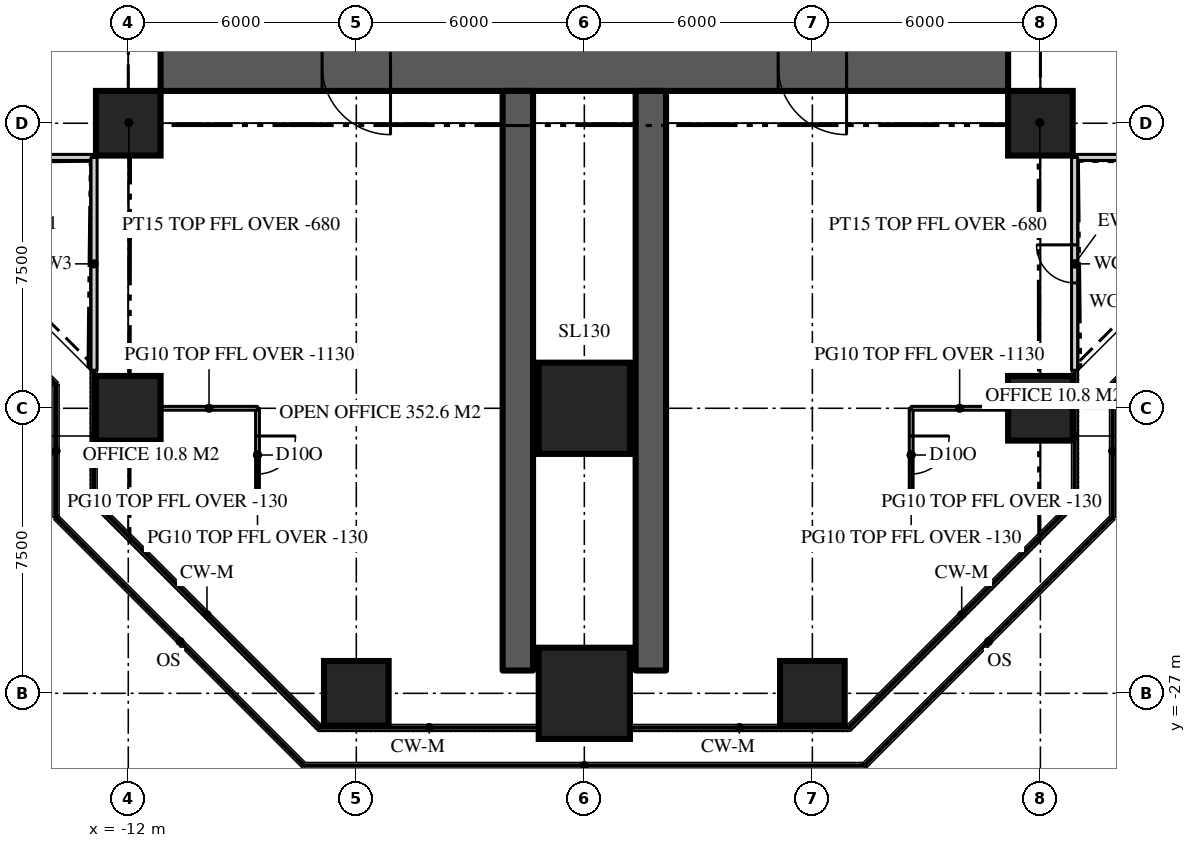
"""IFC4 building model, lengths in metres.
Left out: names, types, materials, properties, quantities, classifications, styles, units other than length and angle.
Written with IfcOpenShell. Run it as: python <this file> out.ifc"""

import sys

from ifc_helpers import new_model, si_unit, direction, frame, frame_2d, origin, origin_2d, place, context, subcontext, project, spatial, rectangle, extrude, element, fill, save


model = new_model("IFC4")
c1 = context("Model", 3, precision=1e-05, world=origin(), true_north=direction((0.0, 1.0)))
c2 = subcontext(c1, "Body", "Model", "MODEL_VIEW")
j1 = project(units=[si_unit("LENGTHUNIT", "METRE"), si_unit("PLANEANGLEUNIT", "RADIAN")], contexts=[c1])
p1 = place(None, origin())
s1 = spatial("IfcSite", under=j1, at=p1, CompositionType="ELEMENT")
p2 = place(p1, origin())
s2 = spatial("IfcBuilding", under=s1, at=p2, CompositionType="ELEMENT")
p3 = place(p2, frame((0.0, 0.0, 143.7)))
s3 = spatial("IfcBuildingStorey", under=s2, at=p3, CompositionType="ELEMENT", Elevation=143.7)
p4 = place(p3, frame((11.15, -10.5, 0.0), z_axis=(0.0, 0.0, 1.0), x_axis=(-1.0, 0.0, 0.0)))
e1 = element("IfcWall", 1, at=p4, inside=s3, PredefinedType="SHEAR", context=c2, shape_type="SweptSolid", body=[
    extrude(rectangle(XDim=22.3, YDim=1.3, at=frame_2d((11.15, 0.0))), origin(), (0.0, 0.0, 1.0), 3.9),
])
p5 = place(p4, frame((16.25, 0.0, 0.0)))
e2 = element("IfcOpeningElement", 2, at=p5, cuts=e1, PredefinedType="OPENING", context=c2, shape_type="SweptSolid", body=[
    extrude(rectangle(XDim=1.8, YDim=2.2, at=frame_2d((0.9, 1.1))), frame((0.0, 0.66, 0.0), z_axis=(0.0, -1.0, 0.0), x_axis=(1.0, 0.0, 0.0)), (0.0, 0.0, 1.0), 1.32),
])
p6 = place(p4, frame((4.25, 0.0, 0.0)))
e3 = element("IfcOpeningElement", 3, at=p6, cuts=e1, PredefinedType="OPENING", context=c2, shape_type="SweptSolid", body=[
    extrude(rectangle(XDim=1.8, YDim=2.2, at=frame_2d((0.9, 1.1))), frame((0.0, 0.66, 0.0), z_axis=(0.0, -1.0, 0.0), x_axis=(1.0, 0.0, 0.0)), (0.0, 0.0, 1.0), 1.32),
])
for number, where, z_axis, x_axis in (
    (4, (-1.75, -11.15, 0.0), (0.0, 0.0, 1.0), (0.0, -1.0, 0.0)),
    (5, (1.75, -11.15, 0.0), (0.0, 0.0, 1.0), (0.0, -1.0, 0.0)),
):
    element("IfcWall", number, at=place(p3, frame(where, z_axis=z_axis, x_axis=x_axis)), inside=s3, PredefinedType="SHEAR", context=c2, shape_type="SweptSolid", body=[
        extrude(rectangle(XDim=15.25, YDim=0.8, at=frame_2d((7.625, 0.0))), origin(), (0.0, 0.0, 1.0), 3.9),
    ])
p7 = place(p3, frame((-6.0, -27.0, 0.0), z_axis=(0.0, 0.0, 1.0), x_axis=(1.0, 0.0, 0.0)))
e6 = element("IfcColumn", 6, at=p7, inside=s3, PredefinedType="COLUMN", context=c2, shape_type="SweptSolid", body=[
    extrude(rectangle(XDim=1.7, YDim=1.7, at=origin_2d()), origin(), (0.0, 0.0, 1.0), 3.9),
])
p8 = place(p3, frame((0.0, -27.0, 0.0), z_axis=(0.0, 0.0, 1.0), x_axis=(1.0, 0.0, 0.0)))
e7 = element("IfcColumn", 7, at=p8, inside=s3, PredefinedType="COLUMN", context=c2, shape_type="SweptSolid", body=[
    extrude(rectangle(XDim=2.4, YDim=2.4, at=origin_2d()), origin(), (0.0, 0.0, 1.0), 3.9),
])
for number, where, z_axis, x_axis in (
    (8, (6.0, -27.0, 0.0), (0.0, 0.0, 1.0), (1.0, 0.0, 0.0)),
    (9, (-12.0, -19.5, 0.0), (0.0, 0.0, 1.0), (1.0, 0.0, 0.0)),
):
    element("IfcColumn", number, at=place(p3, frame(where, z_axis=z_axis, x_axis=x_axis)), inside=s3, PredefinedType="COLUMN", context=c2, shape_type="SweptSolid", body=[
        extrude(rectangle(XDim=1.7, YDim=1.7, at=origin_2d()), origin(), (0.0, 0.0, 1.0), 3.9),
    ])
p9 = place(p3, frame((0.0, -19.5, 0.0), z_axis=(0.0, 0.0, 1.0), x_axis=(1.0, 0.0, 0.0)))
e10 = element("IfcColumn", 10, at=p9, inside=s3, PredefinedType="COLUMN", context=c2, shape_type="SweptSolid", body=[
    extrude(rectangle(XDim=2.4, YDim=2.4, at=origin_2d()), origin(), (0.0, 0.0, 1.0), 3.9),
])
for number, where, z_axis, x_axis in (
    (11, (12.0, -19.5, 0.0), (0.0, 0.0, 1.0), (1.0, 0.0, 0.0)),
    (12, (-12.0, -12.0, 0.0), (0.0, 0.0, 1.0), (1.0, 0.0, 0.0)),
    (13, (12.0, -12.0, 0.0), (0.0, 0.0, 1.0), (1.0, 0.0, 0.0)),
):
    element("IfcColumn", number, at=place(p3, frame(where, z_axis=z_axis, x_axis=x_axis)), inside=s3, PredefinedType="COLUMN", context=c2, shape_type="SweptSolid", body=[
        extrude(rectangle(XDim=1.7, YDim=1.7, at=origin_2d()), origin(), (0.0, 0.0, 1.0), 3.9),
    ])
p10 = place(p3, frame((12.9, -12.9, 0.0), z_axis=(0.0, 0.0, 1.0), x_axis=(1.0, 0.0, 0.0)))
e14 = element("IfcWall", 14, at=p10, inside=s3, PredefinedType="SOLIDWALL", context=c2, shape_type="SweptSolid", body=[
    extrude(rectangle(XDim=5.6, YDim=0.16, at=frame_2d((2.8, 0.0))), origin(), (0.0, 0.0, 1.0), 3.77),
])
p11 = place(p3, frame((-18.5, -12.9, 0.0), z_axis=(0.0, 0.0, 1.0), x_axis=(1.0, 0.0, 0.0)))
e15 = element("IfcWall", 15, at=p11, inside=s3, PredefinedType="SOLIDWALL", context=c2, shape_type="SweptSolid", body=[
    extrude(rectangle(XDim=5.6, YDim=0.16, at=frame_2d((2.8, 0.0))), origin(), (0.0, 0.0, 1.0), 3.77),
])
p12 = place(p11, frame((2.3, 0.0, 0.0)))
e16 = element("IfcOpeningElement", 16, at=p12, cuts=e15, PredefinedType="OPENING", context=c2, shape_type="SweptSolid", body=[
    extrude(rectangle(XDim=1.0, YDim=2.2, at=frame_2d((0.5, 1.1))), frame((0.0, 0.09, 0.0), z_axis=(0.0, -1.0, 0.0), x_axis=(1.0, 0.0, 0.0)), (0.0, 0.0, 1.0), 0.18),
])
p13 = place(p3, frame((-12.9, -12.9, 0.0), z_axis=(0.0, 0.0, 1.0), x_axis=(0.0, -1.0, 0.0)))
e17 = element("IfcWall", 17, at=p13, inside=s3, PredefinedType="SOLIDWALL", context=c2, shape_type="SweptSolid", body=[
    extrude(rectangle(XDim=5.6, YDim=0.16, at=frame_2d((2.8, 0.0))), origin(), (0.0, 0.0, 1.0), 3.77),
])
p14 = place(p3, frame((12.9, -18.5, 0.0), z_axis=(0.0, 0.0, 1.0), x_axis=(0.0, 1.0, 0.0)))
e18 = element("IfcWall", 18, at=p14, inside=s3, PredefinedType="SOLIDWALL", context=c2, shape_type="SweptSolid", body=[
    extrude(rectangle(XDim=5.6, YDim=0.16, at=frame_2d((2.8, 0.0))), origin(), (0.0, 0.0, 1.0), 3.77),
])
p15 = place(p14, frame((2.3, 0.0, 0.0)))
e19 = element("IfcOpeningElement", 19, at=p15, cuts=e18, PredefinedType="OPENING", context=c2, shape_type="SweptSolid", body=[
    extrude(rectangle(XDim=1.0, YDim=2.2, at=frame_2d((0.5, 1.1))), frame((0.0, 0.09, 0.0), z_axis=(0.0, -1.0, 0.0), x_axis=(1.0, 0.0, 0.0)), (0.0, 0.0, 1.0), 0.18),
])
p16 = place(p3, frame((8.6, -19.5, 0.0), z_axis=(0.0, 0.0, 1.0), x_axis=(0.0, -1.0, 0.0)))
e20 = element("IfcWall", 20, at=p16, inside=s3, PredefinedType="PARTITIONING", context=c2, shape_type="SweptSolid", body=[
    extrude(rectangle(XDim=2.459, YDim=0.1, at=frame_2d((1.229, 0.0))), origin(), (0.0, 0.0, 1.0), 3.77),
])
p17 = place(p16, frame((0.729, 0.0, 0.0)))
e21 = element("IfcOpeningElement", 21, at=p17, cuts=e20, PredefinedType="OPENING", context=c2, shape_type="SweptSolid", body=[
    extrude(rectangle(XDim=1.0, YDim=2.2, at=frame_2d((0.5, 1.1))), frame((0.0, 0.06, 0.0), z_axis=(0.0, -1.0, 0.0), x_axis=(1.0, 0.0, 0.0)), (0.0, 0.0, 1.0), 0.12),
])
p18 = place(p3, frame((8.6, -19.5, 0.0), z_axis=(0.0, 0.0, 1.0), x_axis=(1.0, 0.0, 0.0)))
e22 = element("IfcWall", 22, at=p18, inside=s3, PredefinedType="PARTITIONING", context=c2, shape_type="SweptSolid", body=[
    extrude(rectangle(XDim=2.55, YDim=0.1, at=frame_2d((1.275, 0.0))), origin(), (0.0, 0.0, 1.0), 2.77),
])
p19 = place(p3, frame((8.6, -21.959, 0.0), z_axis=(0.0, 0.0, 1.0), x_axis=(1.0, 0.0, 0.0)))
e23 = element("IfcWall", 23, at=p19, inside=s3, PredefinedType="PARTITIONING", context=c2, shape_type="SweptSolid", body=[
    extrude(rectangle(XDim=4.22, YDim=0.1, at=frame_2d((2.11, 0.0))), origin(), (0.0, 0.0, 1.0), 3.77),
])
p20 = place(p3, frame((-8.6, -19.5, 0.0), z_axis=(0.0, 0.0, 1.0), x_axis=(0.0, -1.0, 0.0)))
e24 = element("IfcWall", 24, at=p20, inside=s3, PredefinedType="PARTITIONING", context=c2, shape_type="SweptSolid", body=[
    extrude(rectangle(XDim=2.459, YDim=0.1, at=frame_2d((1.229, 0.0))), origin(), (0.0, 0.0, 1.0), 3.77),
])
p21 = place(p20, frame((0.729, 0.0, 0.0)))
e25 = element("IfcOpeningElement", 25, at=p21, cuts=e24, PredefinedType="OPENING", context=c2, shape_type="SweptSolid", body=[
    extrude(rectangle(XDim=1.0, YDim=2.2, at=frame_2d((0.5, 1.1))), frame((0.0, 0.06, 0.0), z_axis=(0.0, -1.0, 0.0), x_axis=(1.0, 0.0, 0.0)), (0.0, 0.0, 1.0), 0.12),
])
p22 = place(p3, frame((-8.6, -19.5, 0.0), z_axis=(0.0, 0.0, 1.0), x_axis=(-1.0, 0.0, 0.0)))
e26 = element("IfcWall", 26, at=p22, inside=s3, PredefinedType="PARTITIONING", context=c2, shape_type="SweptSolid", body=[
    extrude(rectangle(XDim=2.55, YDim=0.1, at=frame_2d((1.275, 0.0))), origin(), (0.0, 0.0, 1.0), 2.77),
])
p23 = place(p3, frame((-8.6, -21.959, 0.0), z_axis=(0.0, 0.0, 1.0), x_axis=(-1.0, 0.0, 0.0)))
e27 = element("IfcWall", 27, at=p23, inside=s3, PredefinedType="PARTITIONING", context=c2, shape_type="SweptSolid", body=[
    extrude(rectangle(XDim=4.22, YDim=0.1, at=frame_2d((2.11, 0.0))), origin(), (0.0, 0.0, 1.0), 3.77),
])
for number, where, z_axis, x_axis in (
    (28, (-11.15, -11.15, 0.0), (0.0, 0.0, 1.0), (-0.707, -0.707, 0.0)),
    (29, (11.15, -11.15, 0.0), (0.0, 0.0, 1.0), (0.707, -0.707, 0.0)),
):
    element("IfcWall", number, at=place(p3, frame(where, z_axis=z_axis, x_axis=x_axis)), inside=s3, PredefinedType="PARTITIONING", context=c2, shape_type="SweptSolid", body=[
        extrude(rectangle(XDim=2.362, YDim=0.15, at=frame_2d((1.181, 0.0))), origin(), (0.0, 0.0, 1.0), 3.22),
    ])
p24 = place(p15, origin())
e30 = element("IfcDoor", 30, at=p24, inside=s3, OperationType="SINGLE_SWING_RIGHT", PredefinedType="DOOR", context=c2, shape_type="SweptSolid", body=[
    extrude(rectangle(XDim=1.0, YDim=2.2, at=frame_2d((0.5, 1.1))), frame((0.0, 0.025, 0.0), z_axis=(0.0, -1.0, 0.0), x_axis=(1.0, 0.0, 0.0)), (0.0, 0.0, 1.0), 0.05),
])
fill(e19, e30)
p25 = place(p5, origin())
e31 = element("IfcDoor", 31, at=p25, inside=s3, OperationType="DOUBLE_DOOR_DOUBLE_SWING", PredefinedType="DOOR", context=c2, shape_type="SweptSolid", body=[
    extrude(rectangle(XDim=1.8, YDim=2.2, at=frame_2d((0.9, 1.1))), frame((0.0, 0.025, 0.0), z_axis=(0.0, -1.0, 0.0), x_axis=(1.0, 0.0, 0.0)), (0.0, 0.0, 1.0), 0.05),
])
fill(e2, e31)
p26 = place(p6, origin())
e32 = element("IfcDoor", 32, at=p26, inside=s3, OperationType="DOUBLE_DOOR_DOUBLE_SWING", PredefinedType="DOOR", context=c2, shape_type="SweptSolid", body=[
    extrude(rectangle(XDim=1.8, YDim=2.2, at=frame_2d((0.9, 1.1))), frame((0.0, 0.025, 0.0), z_axis=(0.0, -1.0, 0.0), x_axis=(1.0, 0.0, 0.0)), (0.0, 0.0, 1.0), 0.05),
])
fill(e3, e32)
p27 = place(p17, origin())
e33 = element("IfcDoor", 33, at=p27, inside=s3, OperationType="SINGLE_SWING_LEFT", PredefinedType="DOOR", context=c2, shape_type="SweptSolid", body=[
    extrude(rectangle(XDim=1.0, YDim=2.2, at=frame_2d((0.5, 1.1))), frame((0.0, 0.025, 0.0), z_axis=(0.0, -1.0, 0.0), x_axis=(1.0, 0.0, 0.0)), (0.0, 0.0, 1.0), 0.05),
])
fill(e21, e33)
p28 = place(p21, origin())
e34 = element("IfcDoor", 34, at=p28, inside=s3, OperationType="SINGLE_SWING_LEFT", PredefinedType="DOOR", context=c2, shape_type="SweptSolid", body=[
    extrude(rectangle(XDim=1.0, YDim=2.2, at=frame_2d((0.5, 1.1))), frame((0.0, 0.025, 0.0), z_axis=(0.0, -1.0, 0.0), x_axis=(1.0, 0.0, 0.0)), (0.0, 0.0, 1.0), 0.05),
])
fill(e25, e34)
save(model, sys.argv[1])
